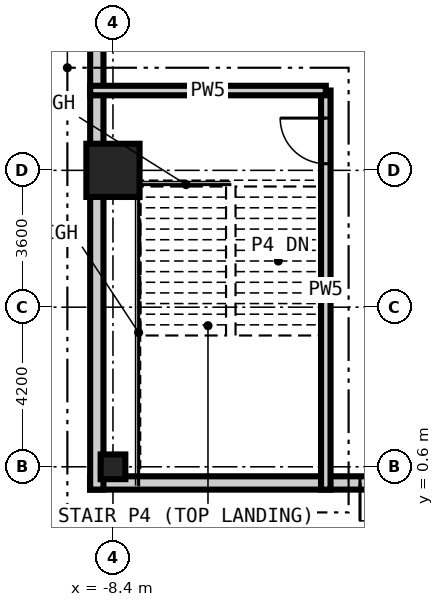
"""IFC4 building model, lengths in metres.
Left out: names, types, materials, properties, quantities, classifications, styles, units other than length and angle.
Written with IfcOpenShell. Run it as: python <this file> out.ifc"""

import sys

from ifc_helpers import new_model, si_unit, direction, frame, frame_2d, origin, origin_2d, place, context, subcontext, project, spatial, rectangle, extrude, element, fill, save


model = new_model("IFC4")
c1 = context("Model", 3, precision=1e-05, world=origin(), true_north=direction((0.0, 1.0)))
c2 = subcontext(c1, "Body", "Model", "MODEL_VIEW")
j1 = project(units=[si_unit("LENGTHUNIT", "METRE"), si_unit("PLANEANGLEUNIT", "RADIAN")], contexts=[c1])
p1 = place(None, origin())
s1 = spatial("IfcSite", under=j1, at=p1, CompositionType="ELEMENT")
p2 = place(p1, origin())
s2 = spatial("IfcBuilding", under=s1, at=p2, CompositionType="ELEMENT")
p3 = place(p2, frame((0.0, 0.0, 17.0)))
s3 = spatial("IfcBuildingStorey", under=s2, at=p3, CompositionType="ELEMENT", Elevation=17.0)
p4 = place(p3, frame((-8.4, 0.6, -0.3), z_axis=(0.0, 0.0, 1.0), x_axis=(1.0, 0.0, 0.0)))
e1 = element("IfcColumn", 1, at=p4, inside=s3, PredefinedType="COLUMN", context=c2, shape_type="SweptSolid", body=[
    extrude(rectangle(XDim=0.65, YDim=0.65, at=origin_2d()), origin(), (0.0, 0.0, 1.0), 4.95),
])
p5 = place(p3, frame((-8.4, 8.4, -0.3), z_axis=(0.0, 0.0, 1.0), x_axis=(1.0, 0.0, 0.0)))
e2 = element("IfcColumn", 2, at=p5, inside=s3, PredefinedType="COLUMN", context=c2, shape_type="SweptSolid", body=[
    extrude(rectangle(XDim=1.4, YDim=1.4, at=origin_2d()), origin(), (0.0, 0.0, 1.0), 4.95),
])
p6 = place(p3, frame((-9.0, 0.175, 0.0), z_axis=(0.0, 0.0, 1.0), x_axis=(1.0, 0.0, 0.0)))
e3 = element("IfcWall", 3, at=p6, inside=s3, PredefinedType="SOLIDWALL", context=c2, shape_type="SweptSolid", body=[
    extrude(rectangle(XDim=67.8, YDim=0.35, at=frame_2d((33.9, 0.0))), origin(), (0.0, 0.0, 1.0), 4.65),
])
p7 = place(p6, frame((7.1, 0.0, 0.0)))
e4 = element("IfcOpeningElement", 4, at=p7, cuts=e3, PredefinedType="OPENING", context=c2, shape_type="SweptSolid", body=[
    extrude(rectangle(XDim=1.0, YDim=2.4, at=frame_2d((0.5, 1.2))), frame((0.0, 0.185, 0.0), z_axis=(0.0, -1.0, 0.0), x_axis=(1.0, 0.0, 0.0)), (0.0, 0.0, 1.0), 0.37),
])
p8 = place(p6, frame((18.7, 0.0, 0.0)))
e5 = element("IfcOpeningElement", 5, at=p8, cuts=e3, PredefinedType="OPENING", context=c2, shape_type="SweptSolid", body=[
    extrude(rectangle(XDim=1.0, YDim=2.4, at=frame_2d((0.5, 1.2))), frame((0.0, 0.185, 0.0), z_axis=(0.0, -1.0, 0.0), x_axis=(1.0, 0.0, 0.0)), (0.0, 0.0, 1.0), 0.37),
])
p9 = place(p6, frame((10.2, 0.0, 0.6)))
e6 = element("IfcOpeningElement", 6, at=p9, cuts=e3, PredefinedType="OPENING", context=c2, shape_type="SweptSolid", body=[
    extrude(rectangle(XDim=1.8, YDim=2.1, at=frame_2d((0.9, 1.05))), frame((0.0, 0.185, 0.0), z_axis=(0.0, -1.0, 0.0), x_axis=(1.0, 0.0, 0.0)), (0.0, 0.0, 1.0), 0.37),
])
p10 = place(p6, frame((14.3, 0.0, 0.6)))
e7 = element("IfcOpeningElement", 7, at=p10, cuts=e3, PredefinedType="OPENING", context=c2, shape_type="SweptSolid", body=[
    extrude(rectangle(XDim=1.8, YDim=2.1, at=frame_2d((0.9, 1.05))), frame((0.0, 0.185, 0.0), z_axis=(0.0, -1.0, 0.0), x_axis=(1.0, 0.0, 0.0)), (0.0, 0.0, 1.0), 0.37),
])
p11 = place(p6, frame((22.7, 0.0, 0.6)))
e8 = element("IfcOpeningElement", 8, at=p11, cuts=e3, PredefinedType="OPENING", context=c2, shape_type="SweptSolid", body=[
    extrude(rectangle(XDim=1.8, YDim=2.1, at=frame_2d((0.9, 1.05))), frame((0.0, 0.185, 0.0), z_axis=(0.0, -1.0, 0.0), x_axis=(1.0, 0.0, 0.0)), (0.0, 0.0, 1.0), 0.37),
])
p12 = place(p6, frame((28.9, 0.0, 0.0)))
e9 = element("IfcOpeningElement", 9, at=p12, cuts=e3, PredefinedType="OPENING", context=c2, shape_type="SweptSolid", body=[
    extrude(rectangle(XDim=1.0, YDim=2.4, at=frame_2d((0.5, 1.2))), frame((0.0, 0.185, 0.0), z_axis=(0.0, -1.0, 0.0), x_axis=(1.0, 0.0, 0.0)), (0.0, 0.0, 1.0), 0.37),
])
p13 = place(p6, frame((30.6, 0.0, 0.6)))
e10 = element("IfcOpeningElement", 10, at=p13, cuts=e3, PredefinedType="OPENING", context=c2, shape_type="SweptSolid", body=[
    extrude(rectangle(XDim=1.8, YDim=2.1, at=frame_2d((0.9, 1.05))), frame((0.0, 0.185, 0.0), z_axis=(0.0, -1.0, 0.0), x_axis=(1.0, 0.0, 0.0)), (0.0, 0.0, 1.0), 0.37),
])
p14 = place(p6, frame((54.7, 0.0, 0.0)))
e11 = element("IfcOpeningElement", 11, at=p14, cuts=e3, PredefinedType="OPENING", context=c2, shape_type="SweptSolid", body=[
    extrude(rectangle(XDim=1.0, YDim=2.4, at=frame_2d((0.5, 1.2))), frame((0.0, 0.185, 0.0), z_axis=(0.0, -1.0, 0.0), x_axis=(1.0, 0.0, 0.0)), (0.0, 0.0, 1.0), 0.37),
])
p15 = place(p6, frame((43.9, 0.0, 0.6)))
e12 = element("IfcOpeningElement", 12, at=p15, cuts=e3, PredefinedType="OPENING", context=c2, shape_type="SweptSolid", body=[
    extrude(rectangle(XDim=1.8, YDim=2.1, at=frame_2d((0.9, 1.05))), frame((0.0, 0.185, 0.0), z_axis=(0.0, -1.0, 0.0), x_axis=(1.0, 0.0, 0.0)), (0.0, 0.0, 1.0), 0.37),
])
p16 = place(p6, frame((47.9, 0.0, 0.6)))
e13 = element("IfcOpeningElement", 13, at=p16, cuts=e3, PredefinedType="OPENING", context=c2, shape_type="SweptSolid", body=[
    extrude(rectangle(XDim=1.8, YDim=2.1, at=frame_2d((0.9, 1.05))), frame((0.0, 0.185, 0.0), z_axis=(0.0, -1.0, 0.0), x_axis=(1.0, 0.0, 0.0)), (0.0, 0.0, 1.0), 0.37),
])
p17 = place(p6, frame((52.3, 0.0, 0.6)))
e14 = element("IfcOpeningElement", 14, at=p17, cuts=e3, PredefinedType="OPENING", context=c2, shape_type="SweptSolid", body=[
    extrude(rectangle(XDim=1.8, YDim=2.1, at=frame_2d((0.9, 1.05))), frame((0.0, 0.185, 0.0), z_axis=(0.0, -1.0, 0.0), x_axis=(1.0, 0.0, 0.0)), (0.0, 0.0, 1.0), 0.37),
])
p18 = place(p6, frame((56.3, 0.0, 0.6)))
e15 = element("IfcOpeningElement", 15, at=p18, cuts=e3, PredefinedType="OPENING", context=c2, shape_type="SweptSolid", body=[
    extrude(rectangle(XDim=1.8, YDim=2.1, at=frame_2d((0.9, 1.05))), frame((0.0, 0.185, 0.0), z_axis=(0.0, -1.0, 0.0), x_axis=(1.0, 0.0, 0.0)), (0.0, 0.0, 1.0), 0.37),
])
p19 = place(p6, frame((60.7, 0.0, 0.6)))
e16 = element("IfcOpeningElement", 16, at=p19, cuts=e3, PredefinedType="OPENING", context=c2, shape_type="SweptSolid", body=[
    extrude(rectangle(XDim=1.8, YDim=2.1, at=frame_2d((0.9, 1.05))), frame((0.0, 0.185, 0.0), z_axis=(0.0, -1.0, 0.0), x_axis=(1.0, 0.0, 0.0)), (0.0, 0.0, 1.0), 0.37),
])
p20 = place(p6, frame((64.8, 0.0, 0.6)))
e17 = element("IfcOpeningElement", 17, at=p20, cuts=e3, PredefinedType="OPENING", context=c2, shape_type="SweptSolid", body=[
    extrude(rectangle(XDim=1.8, YDim=2.1, at=frame_2d((0.9, 1.05))), frame((0.0, 0.185, 0.0), z_axis=(0.0, -1.0, 0.0), x_axis=(1.0, 0.0, 0.0)), (0.0, 0.0, 1.0), 0.37),
])
p21 = place(p3, frame((-8.825, 58.8, 0.0), z_axis=(0.0, 0.0, 1.0), x_axis=(0.0, -1.0, 0.0)))
e18 = element("IfcWall", 18, at=p21, inside=s3, PredefinedType="SOLIDWALL", context=c2, shape_type="SweptSolid", body=[
    extrude(rectangle(XDim=58.8, YDim=0.35, at=frame_2d((29.4, 0.0))), origin(), (0.0, 0.0, 1.0), 4.65),
])
p22 = place(p21, frame((28.9, 0.0, 0.0)))
e19 = element("IfcOpeningElement", 19, at=p22, cuts=e18, PredefinedType="OPENING", context=c2, shape_type="SweptSolid", body=[
    extrude(rectangle(XDim=1.0, YDim=2.4, at=frame_2d((0.5, 1.2))), frame((0.0, 0.185, 0.0), z_axis=(0.0, -1.0, 0.0), x_axis=(1.0, 0.0, 0.0)), (0.0, 0.0, 1.0), 0.37),
])
p23 = place(p21, frame((45.3, 0.0, 0.6)))
e20 = element("IfcOpeningElement", 20, at=p23, cuts=e18, PredefinedType="OPENING", context=c2, shape_type="SweptSolid", body=[
    extrude(rectangle(XDim=1.8, YDim=2.1, at=frame_2d((0.9, 1.05))), frame((0.0, 0.185, 0.0), z_axis=(0.0, -1.0, 0.0), x_axis=(1.0, 0.0, 0.0)), (0.0, 0.0, 1.0), 0.37),
])
p24 = place(p21, frame((36.9, 0.0, 0.6)))
e21 = element("IfcOpeningElement", 21, at=p24, cuts=e18, PredefinedType="OPENING", context=c2, shape_type="SweptSolid", body=[
    extrude(rectangle(XDim=1.8, YDim=2.1, at=frame_2d((0.9, 1.05))), frame((0.0, 0.185, 0.0), z_axis=(0.0, -1.0, 0.0), x_axis=(1.0, 0.0, 0.0)), (0.0, 0.0, 1.0), 0.37),
])
p25 = place(p21, frame((20.1, 0.0, 0.6)))
e22 = element("IfcOpeningElement", 22, at=p25, cuts=e18, PredefinedType="OPENING", context=c2, shape_type="SweptSolid", body=[
    extrude(rectangle(XDim=1.8, YDim=2.1, at=frame_2d((0.9, 1.05))), frame((0.0, 0.185, 0.0), z_axis=(0.0, -1.0, 0.0), x_axis=(1.0, 0.0, 0.0)), (0.0, 0.0, 1.0), 0.37),
])
p26 = place(p21, frame((11.7, 0.0, 0.6)))
e23 = element("IfcOpeningElement", 23, at=p26, cuts=e18, PredefinedType="OPENING", context=c2, shape_type="SweptSolid", body=[
    extrude(rectangle(XDim=1.8, YDim=2.1, at=frame_2d((0.9, 1.05))), frame((0.0, 0.185, 0.0), z_axis=(0.0, -1.0, 0.0), x_axis=(1.0, 0.0, 0.0)), (0.0, 0.0, 1.0), 0.37),
])
p27 = place(p3, frame((-2.8, 0.0, 0.0), z_axis=(0.0, 0.0, 1.0), x_axis=(0.0, 1.0, 0.0)))
e24 = element("IfcWall", 24, at=p27, inside=s3, PredefinedType="PARTITIONING", context=c2, shape_type="SweptSolid", body=[
    extrude(rectangle(XDim=10.5, YDim=0.25, at=frame_2d((5.25, 0.0))), origin(), (0.0, 0.0, 1.0), 4.65),
])
p28 = place(p27, frame((8.575, 0.0, 0.0)))
e25 = element("IfcOpeningElement", 25, at=p28, cuts=e24, PredefinedType="OPENING", context=c2, shape_type="SweptSolid", body=[
    extrude(rectangle(XDim=1.2, YDim=2.2, at=frame_2d((0.6, 1.1))), frame((0.0, 0.135, 0.0), z_axis=(0.0, -1.0, 0.0), x_axis=(1.0, 0.0, 0.0)), (0.0, 0.0, 1.0), 0.27),
])
p29 = place(p3, frame((-9.0, 10.5, 0.0), z_axis=(0.0, 0.0, 1.0), x_axis=(1.0, 0.0, 0.0)))
e26 = element("IfcWall", 26, at=p29, inside=s3, PredefinedType="PARTITIONING", context=c2, shape_type="SweptSolid", body=[
    extrude(rectangle(XDim=6.2, YDim=0.25, at=frame_2d((3.1, 0.0))), origin(), (0.0, 0.0, 1.0), 4.65),
])
p30 = place(p7, frame((1.0, 0.0, 0.0), z_axis=(0.0, 0.0, 1.0), x_axis=(-1.0, 0.0, 0.0)))
e27 = element("IfcDoor", 27, at=p30, inside=s3, OperationType="SINGLE_SWING_RIGHT", PredefinedType="DOOR", context=c2, shape_type="SweptSolid", body=[
    extrude(rectangle(XDim=1.0, YDim=2.4, at=frame_2d((0.5, 1.2))), frame((0.0, 0.025, 0.0), z_axis=(0.0, -1.0, 0.0), x_axis=(1.0, 0.0, 0.0)), (0.0, 0.0, 1.0), 0.05),
])
fill(e4, e27)
p31 = place(p28, origin())
e28 = element("IfcDoor", 28, at=p31, inside=s3, OperationType="SINGLE_SWING_RIGHT", PredefinedType="DOOR", context=c2, shape_type="SweptSolid", body=[
    extrude(rectangle(XDim=1.2, YDim=2.2, at=frame_2d((0.6, 1.1))), frame((0.0, 0.025, 0.0), z_axis=(0.0, -1.0, 0.0), x_axis=(1.0, 0.0, 0.0)), (0.0, 0.0, 1.0), 0.05),
])
fill(e25, e28)
save(model, sys.argv[1])
